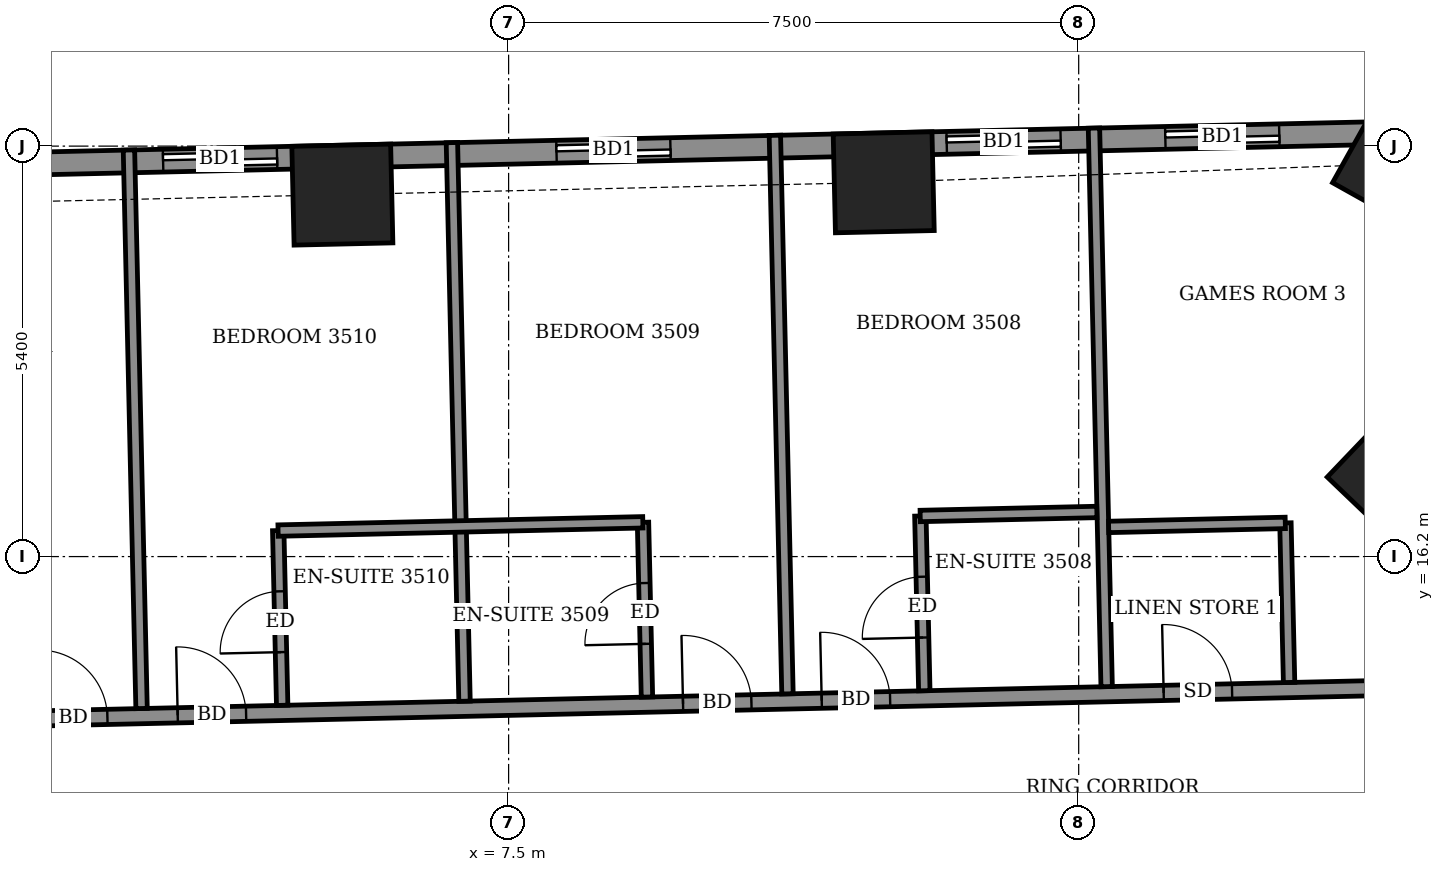
"""IFC4 building model, lengths in metres.
Left out: names, types, materials, properties, quantities, classifications, styles, units other than length and angle.
Written with IfcOpenShell. Run it as: python <this file> out.ifc"""

import sys

from ifc_helpers import new_model, si_unit, direction, frame, frame_2d, origin, origin_2d, place, context, subcontext, project, spatial, rectangle, extrude, element, fill, save


model = new_model("IFC4")
c1 = context("Model", 3, precision=1e-05, world=origin(), true_north=direction((0.0, 1.0)))
c2 = subcontext(c1, "Body", "Model", "MODEL_VIEW")
j1 = project(units=[si_unit("LENGTHUNIT", "METRE"), si_unit("PLANEANGLEUNIT", "RADIAN")], contexts=[c1])
p1 = place(None, origin())
s1 = spatial("IfcSite", under=j1, at=p1, CompositionType="ELEMENT")
p2 = place(p1, origin())
s2 = spatial("IfcBuilding", under=s1, at=p2, CompositionType="ELEMENT")
p3 = place(p2, frame((0.0, 0.0, 140.9)))
s3 = spatial("IfcBuildingStorey", under=s2, at=p3, CompositionType="ELEMENT", Elevation=140.9)
for number, where, z_axis, x_axis in (
    (1, (19.189, 17.267, -0.55), (0.0, 0.0, 1.0), (-0.723, 0.691, 0.0)),
    (2, (19.225, 21.369, -0.55), (0.0, 0.0, 1.0), (-0.873, 0.488, 0.0)),
    (3, (12.435, 21.124, -0.55), (0.0, 0.0, 1.0), (-1.0, -0.023, 0.0)),
    (4, (5.313, 20.962, -0.55), (0.0, 0.0, 1.0), (-1.0, -0.023, 0.0)),
):
    element("IfcColumn", number, at=place(p3, frame(where, z_axis=z_axis, x_axis=x_axis)), inside=s3, PredefinedType="COLUMN", context=c2, shape_type="SweptSolid", body=[
        extrude(rectangle(XDim=1.3, YDim=1.3, at=origin_2d()), origin(), (0.0, 0.0, 1.0), 3.6),
    ])
p4 = place(p3, frame((19.396, 21.782, 0.0), z_axis=(0.0, 0.0, 1.0), x_axis=(-0.999742636707, -0.022686126826, 0.0)))
e5 = element("IfcWall", 5, at=p4, inside=s3, PredefinedType="SOLIDWALL", context=c2, shape_type="SweptSolid", body=[
    extrude(rectangle(XDim=42.444, YDim=0.3, at=frame_2d((21.222, 0.0))), origin(), (0.0, 0.0, 1.0), 3.05),
])
p5 = place(p4, frame((1.757, 0.0, 0.0)))
e6 = element("IfcOpeningElement", 6, at=p5, cuts=e5, PredefinedType="OPENING", context=c2, shape_type="SweptSolid", body=[
    extrude(rectangle(XDim=1.5, YDim=2.4, at=frame_2d((0.75, 1.2))), frame((0.0, 0.16, 0.0), z_axis=(0.0, -1.0, 0.0), x_axis=(1.0, 0.0, 0.0)), (0.0, 0.0, 1.0), 0.32),
])
p6 = place(p4, frame((4.634, 0.0, 0.0)))
e7 = element("IfcOpeningElement", 7, at=p6, cuts=e5, PredefinedType="OPENING", context=c2, shape_type="SweptSolid", body=[
    extrude(rectangle(XDim=1.5, YDim=2.4, at=frame_2d((0.75, 1.2))), frame((0.0, 0.16, 0.0), z_axis=(0.0, -1.0, 0.0), x_axis=(1.0, 0.0, 0.0)), (0.0, 0.0, 1.0), 0.32),
])
p7 = place(p4, frame((9.769, 0.0, 0.0)))
e8 = element("IfcOpeningElement", 8, at=p7, cuts=e5, PredefinedType="OPENING", context=c2, shape_type="SweptSolid", body=[
    extrude(rectangle(XDim=1.5, YDim=2.4, at=frame_2d((0.75, 1.2))), frame((0.0, 0.16, 0.0), z_axis=(0.0, -1.0, 0.0), x_axis=(1.0, 0.0, 0.0)), (0.0, 0.0, 1.0), 0.32),
])
p8 = place(p4, frame((14.946, 0.0, 0.0)))
e9 = element("IfcOpeningElement", 9, at=p8, cuts=e5, PredefinedType="OPENING", context=c2, shape_type="SweptSolid", body=[
    extrude(rectangle(XDim=1.5, YDim=2.4, at=frame_2d((0.75, 1.2))), frame((0.0, 0.16, 0.0), z_axis=(0.0, -1.0, 0.0), x_axis=(1.0, 0.0, 0.0)), (0.0, 0.0, 1.0), 0.32),
])
p9 = place(p4, frame((18.108, 0.0, 0.0)))
e10 = element("IfcOpeningElement", 10, at=p9, cuts=e5, PredefinedType="OPENING", context=c2, shape_type="SweptSolid", body=[
    extrude(rectangle(XDim=1.5, YDim=2.4, at=frame_2d((0.75, 1.2))), frame((0.0, 0.16, 0.0), z_axis=(0.0, -1.0, 0.0), x_axis=(1.0, 0.0, 0.0)), (0.0, 0.0, 1.0), 0.32),
])
p10 = place(p4, frame((22.733, 0.0, 0.0)))
e11 = element("IfcOpeningElement", 11, at=p10, cuts=e5, PredefinedType="OPENING", context=c2, shape_type="SweptSolid", body=[
    extrude(rectangle(XDim=1.5, YDim=2.4, at=frame_2d((0.75, 1.2))), frame((0.0, 0.16, 0.0), z_axis=(0.0, -1.0, 0.0), x_axis=(1.0, 0.0, 0.0)), (0.0, 0.0, 1.0), 0.32),
])
p11 = place(p4, frame((25.895, 0.0, 0.0)))
e12 = element("IfcOpeningElement", 12, at=p11, cuts=e5, PredefinedType="OPENING", context=c2, shape_type="SweptSolid", body=[
    extrude(rectangle(XDim=1.5, YDim=2.4, at=frame_2d((0.75, 1.2))), frame((0.0, 0.16, 0.0), z_axis=(0.0, -1.0, 0.0), x_axis=(1.0, 0.0, 0.0)), (0.0, 0.0, 1.0), 0.32),
])
p12 = place(p4, frame((30.944, 0.0, 0.0)))
e13 = element("IfcOpeningElement", 13, at=p12, cuts=e5, PredefinedType="OPENING", context=c2, shape_type="SweptSolid", body=[
    extrude(rectangle(XDim=1.5, YDim=2.4, at=frame_2d((0.75, 1.2))), frame((0.0, 0.16, 0.0), z_axis=(0.0, -1.0, 0.0), x_axis=(1.0, 0.0, 0.0)), (0.0, 0.0, 1.0), 0.32),
])
p13 = place(p4, frame((36.232, 0.0, 0.0)))
e14 = element("IfcOpeningElement", 14, at=p13, cuts=e5, PredefinedType="OPENING", context=c2, shape_type="SweptSolid", body=[
    extrude(rectangle(XDim=1.5, YDim=2.4, at=frame_2d((0.75, 1.2))), frame((0.0, 0.16, 0.0), z_axis=(0.0, -1.0, 0.0), x_axis=(1.0, 0.0, 0.0)), (0.0, 0.0, 1.0), 0.32),
])
p14 = place(p4, frame((38.612, 0.0, 0.9)))
e15 = element("IfcOpeningElement", 15, at=p14, cuts=e5, PredefinedType="OPENING", context=c2, shape_type="SweptSolid", body=[
    extrude(rectangle(XDim=2.4, YDim=1.5, at=frame_2d((1.2, 0.75))), frame((0.0, 0.16, 0.0), z_axis=(0.0, -1.0, 0.0), x_axis=(1.0, 0.0, 0.0)), (0.0, 0.0, 1.0), 0.32),
])
p15 = place(p3, frame((16.679, 12.918, 0.0), z_axis=(0.0, 0.0, 1.0), x_axis=(0.999739057042, 0.022843332181, 0.0)))
e16 = element("IfcWall", 16, at=p15, inside=s3, PredefinedType="PARTITIONING", context=c2, shape_type="SweptSolid", body=[
    extrude(rectangle(XDim=5.867, YDim=0.2, at=frame_2d((2.934, 0.0))), origin(), (0.0, 0.0, 1.0), 3.05),
])
p16 = place(p15, frame((3.134, 0.0, 0.0)))
e17 = element("IfcOpeningElement", 17, at=p16, cuts=e16, PredefinedType="OPENING", context=c2, shape_type="SweptSolid", body=[
    extrude(rectangle(XDim=1.0, YDim=2.1, at=frame_2d((0.5, 1.05))), frame((0.0, 0.11, 0.0), z_axis=(0.0, -1.0, 0.0), x_axis=(1.0, 0.0, 0.0)), (0.0, 0.0, 1.0), 0.22),
])
p17 = place(p3, frame((-26.421, 13.441, 0.0), z_axis=(0.0, 0.0, 1.0), x_axis=(0.999742754064, 0.022680954485, 0.0)))
e18 = element("IfcWall", 18, at=p17, inside=s3, PredefinedType="PARTITIONING", context=c2, shape_type="SweptSolid", body=[
    extrude(rectangle(XDim=48.945, YDim=0.2, at=frame_2d((24.472, 0.0))), origin(), (0.0, 0.0, 1.0), 3.05),
])
p18 = place(p17, frame((46.772, 0.0, 0.0)))
e19 = element("IfcOpeningElement", 19, at=p18, cuts=e18, PredefinedType="OPENING", context=c2, shape_type="SweptSolid", body=[
    extrude(rectangle(XDim=1.0, YDim=2.1, at=frame_2d((0.5, 1.05))), frame((0.0, 0.11, 0.0), z_axis=(0.0, -1.0, 0.0), x_axis=(1.0, 0.0, 0.0)), (0.0, 0.0, 1.0), 0.22),
])
p19 = place(p17, frame((42.55, 0.0, 0.0)))
e20 = element("IfcOpeningElement", 20, at=p19, cuts=e18, PredefinedType="OPENING", context=c2, shape_type="SweptSolid", body=[
    extrude(rectangle(XDim=0.9, YDim=2.1, at=frame_2d((0.45, 1.05))), frame((0.0, 0.11, 0.0), z_axis=(0.0, -1.0, 0.0), x_axis=(1.0, 0.0, 0.0)), (0.0, 0.0, 1.0), 0.22),
])
p20 = place(p17, frame((38.05, 0.0, 0.0)))
e21 = element("IfcOpeningElement", 21, at=p20, cuts=e18, PredefinedType="OPENING", context=c2, shape_type="SweptSolid", body=[
    extrude(rectangle(XDim=0.9, YDim=2.1, at=frame_2d((0.45, 1.05))), frame((0.0, 0.11, 0.0), z_axis=(0.0, -1.0, 0.0), x_axis=(1.0, 0.0, 0.0)), (0.0, 0.0, 1.0), 0.22),
])
p21 = place(p17, frame((36.225, 0.0, 0.0)))
e22 = element("IfcOpeningElement", 22, at=p21, cuts=e18, PredefinedType="OPENING", context=c2, shape_type="SweptSolid", body=[
    extrude(rectangle(XDim=0.9, YDim=2.1, at=frame_2d((0.45, 1.05))), frame((0.0, 0.11, 0.0), z_axis=(0.0, -1.0, 0.0), x_axis=(1.0, 0.0, 0.0)), (0.0, 0.0, 1.0), 0.22),
])
p22 = place(p17, frame((29.575, 0.0, 0.0)))
e23 = element("IfcOpeningElement", 23, at=p22, cuts=e18, PredefinedType="OPENING", context=c2, shape_type="SweptSolid", body=[
    extrude(rectangle(XDim=0.9, YDim=2.1, at=frame_2d((0.45, 1.05))), frame((0.0, 0.11, 0.0), z_axis=(0.0, -1.0, 0.0), x_axis=(1.0, 0.0, 0.0)), (0.0, 0.0, 1.0), 0.22),
])
p23 = place(p17, frame((27.75, 0.0, 0.0)))
e24 = element("IfcOpeningElement", 24, at=p23, cuts=e18, PredefinedType="OPENING", context=c2, shape_type="SweptSolid", body=[
    extrude(rectangle(XDim=0.9, YDim=2.1, at=frame_2d((0.45, 1.05))), frame((0.0, 0.11, 0.0), z_axis=(0.0, -1.0, 0.0), x_axis=(1.0, 0.0, 0.0)), (0.0, 0.0, 1.0), 0.22),
])
p24 = place(p17, frame((21.125, 0.0, 0.0)))
e25 = element("IfcOpeningElement", 25, at=p24, cuts=e18, PredefinedType="OPENING", context=c2, shape_type="SweptSolid", body=[
    extrude(rectangle(XDim=0.9, YDim=2.1, at=frame_2d((0.45, 1.05))), frame((0.0, 0.11, 0.0), z_axis=(0.0, -1.0, 0.0), x_axis=(1.0, 0.0, 0.0)), (0.0, 0.0, 1.0), 0.22),
])
p25 = place(p17, frame((19.275, 0.0, 0.0)))
e26 = element("IfcOpeningElement", 26, at=p25, cuts=e18, PredefinedType="OPENING", context=c2, shape_type="SweptSolid", body=[
    extrude(rectangle(XDim=0.9, YDim=2.1, at=frame_2d((0.45, 1.05))), frame((0.0, 0.11, 0.0), z_axis=(0.0, -1.0, 0.0), x_axis=(1.0, 0.0, 0.0)), (0.0, 0.0, 1.0), 0.22),
])
p26 = place(p17, frame((12.65, 0.0, 0.0)))
e27 = element("IfcOpeningElement", 27, at=p26, cuts=e18, PredefinedType="OPENING", context=c2, shape_type="SweptSolid", body=[
    extrude(rectangle(XDim=0.9, YDim=2.1, at=frame_2d((0.45, 1.05))), frame((0.0, 0.11, 0.0), z_axis=(0.0, -1.0, 0.0), x_axis=(1.0, 0.0, 0.0)), (0.0, 0.0, 1.0), 0.22),
])
p27 = place(p17, frame((10.8, 0.0, 0.0)))
e28 = element("IfcOpeningElement", 28, at=p27, cuts=e18, PredefinedType="OPENING", context=c2, shape_type="SweptSolid", body=[
    extrude(rectangle(XDim=0.9, YDim=2.1, at=frame_2d((0.45, 1.05))), frame((0.0, 0.11, 0.0), z_axis=(0.0, -1.0, 0.0), x_axis=(1.0, 0.0, 0.0)), (0.0, 0.0, 1.0), 0.22),
])
p28 = place(p17, frame((1.55, 0.0, 0.0)))
e29 = element("IfcOpeningElement", 29, at=p28, cuts=e18, PredefinedType="OPENING", context=c2, shape_type="SweptSolid", body=[
    extrude(rectangle(XDim=1.0, YDim=2.1, at=frame_2d((0.5, 1.05))), frame((0.0, 0.11, 0.0), z_axis=(0.0, -1.0, 0.0), x_axis=(1.0, 0.0, 0.0)), (0.0, 0.0, 1.0), 0.22),
])
p29 = place(p17, frame((6.25, 0.0, 0.0)))
e30 = element("IfcOpeningElement", 30, at=p29, cuts=e18, PredefinedType="OPENING", context=c2, shape_type="SweptSolid", body=[
    extrude(rectangle(XDim=0.9, YDim=2.1, at=frame_2d((0.45, 1.05))), frame((0.0, 0.11, 0.0), z_axis=(0.0, -1.0, 0.0), x_axis=(1.0, 0.0, 0.0)), (0.0, 0.0, 1.0), 0.22),
])
p30 = place(p3, frame((2.671, 14.201, 0.0), z_axis=(0.0, 0.0, 1.0), x_axis=(-0.022587099398, 0.999744878927, 0.0)))
e31 = element("IfcWall", 31, at=p30, inside=s3, PredefinedType="PARTITIONING", context=c2, shape_type="SweptSolid", body=[
    extrude(rectangle(XDim=7.35, YDim=0.15, at=frame_2d((3.675, 0.0))), origin(), (0.0, 0.0, 1.0), 2.55),
])
p31 = place(p3, frame((4.521, 14.243, 0.0), z_axis=(0.0, 0.0, 1.0), x_axis=(-0.022612884682, 0.999744296031, 0.0)))
e32 = element("IfcWall", 32, at=p31, inside=s3, PredefinedType="PARTITIONING", context=c2, shape_type="SweptSolid", body=[
    extrude(rectangle(XDim=2.3, YDim=0.15, at=frame_2d((1.15, 0.0))), origin(), (0.0, 0.0, 1.0), 3.05),
])
p32 = place(p31, frame((0.7, 0.0, 0.0)))
e33 = element("IfcOpeningElement", 33, at=p32, cuts=e32, PredefinedType="OPENING", context=c2, shape_type="SweptSolid", body=[
    extrude(rectangle(XDim=0.8, YDim=2.1, at=frame_2d((0.4, 1.05))), frame((0.0, 0.085, 0.0), z_axis=(0.0, -1.0, 0.0), x_axis=(1.0, 0.0, 0.0)), (0.0, 0.0, 1.0), 0.17),
])
p33 = place(p3, frame((6.92, 14.297, 0.0), z_axis=(0.0, 0.0, 1.0), x_axis=(-0.022584849415, 0.999744929758, 0.0)))
e34 = element("IfcWall", 34, at=p33, inside=s3, PredefinedType="PARTITIONING", context=c2, shape_type="SweptSolid", body=[
    extrude(rectangle(XDim=7.351, YDim=0.15, at=frame_2d((3.675, 0.0))), origin(), (0.0, 0.0, 1.0), 2.55),
])
p34 = place(p3, frame((9.32, 14.352, 0.0), z_axis=(0.0, 0.0, 1.0), x_axis=(-0.022615284993, 0.999744241736, 0.0)))
e35 = element("IfcWall", 35, at=p34, inside=s3, PredefinedType="PARTITIONING", context=c2, shape_type="SweptSolid", body=[
    extrude(rectangle(XDim=2.299, YDim=0.15, at=frame_2d((1.15, 0.0))), origin(), (0.0, 0.0, 1.0), 3.05),
])
p35 = place(p34, frame((0.7, 0.0, 0.0)))
e36 = element("IfcOpeningElement", 36, at=p35, cuts=e35, PredefinedType="OPENING", context=c2, shape_type="SweptSolid", body=[
    extrude(rectangle(XDim=0.8, YDim=2.1, at=frame_2d((0.4, 1.05))), frame((0.0, 0.085, 0.0), z_axis=(0.0, -1.0, 0.0), x_axis=(1.0, 0.0, 0.0)), (0.0, 0.0, 1.0), 0.17),
])
p36 = place(p3, frame((11.169, 14.394, 0.0), z_axis=(0.0, 0.0, 1.0), x_axis=(-0.022587849492, 0.99974486198, 0.0)))
e37 = element("IfcWall", 37, at=p36, inside=s3, PredefinedType="PARTITIONING", context=c2, shape_type="SweptSolid", body=[
    extrude(rectangle(XDim=7.35, YDim=0.15, at=frame_2d((3.675, 0.0))), origin(), (0.0, 0.0, 1.0), 2.55),
])
p37 = place(p3, frame((12.969, 14.435, 0.0), z_axis=(0.0, 0.0, 1.0), x_axis=(-0.022615284993, 0.999744241736, 0.0)))
e38 = element("IfcWall", 38, at=p37, inside=s3, PredefinedType="PARTITIONING", context=c2, shape_type="SweptSolid", body=[
    extrude(rectangle(XDim=2.299, YDim=0.15, at=frame_2d((1.15, 0.0))), origin(), (0.0, 0.0, 1.0), 3.05),
])
p38 = place(p37, frame((0.7, 0.0, 0.0)))
e39 = element("IfcOpeningElement", 39, at=p38, cuts=e38, PredefinedType="OPENING", context=c2, shape_type="SweptSolid", body=[
    extrude(rectangle(XDim=0.8, YDim=2.1, at=frame_2d((0.4, 1.05))), frame((0.0, 0.085, 0.0), z_axis=(0.0, -1.0, 0.0), x_axis=(1.0, 0.0, 0.0)), (0.0, 0.0, 1.0), 0.17),
])
p39 = place(p3, frame((15.368, 14.489, 0.0), z_axis=(0.0, 0.0, 1.0), x_axis=(-0.022720650804, 0.999741852694, 0.0)))
e40 = element("IfcWall", 40, at=p39, inside=s3, PredefinedType="PARTITIONING", context=c2, shape_type="SweptSolid", body=[
    extrude(rectangle(XDim=7.35, YDim=0.15, at=frame_2d((3.675, 0.0))), origin(), (0.0, 0.0, 1.0), 2.55),
])
p40 = place(p3, frame((17.768, 14.544, 0.0), z_axis=(0.0, 0.0, 1.0), x_axis=(-0.022906293375, 0.999737616439, 0.0)))
e41 = element("IfcWall", 41, at=p40, inside=s3, PredefinedType="PARTITIONING", context=c2, shape_type="SweptSolid", body=[
    extrude(rectangle(XDim=2.1, YDim=0.15, at=frame_2d((1.05, 0.0))), origin(), (0.0, 0.0, 1.0), 3.05),
])
p41 = place(p3, frame((15.394, 16.59, 0.0), z_axis=(0.0, 0.0, 1.0), x_axis=(0.999740260747, 0.02279059109, 0.0)))
e42 = element("IfcWall", 42, at=p41, inside=s3, PredefinedType="PARTITIONING", context=c2, shape_type="SweptSolid", body=[
    extrude(rectangle(XDim=2.324, YDim=0.15, at=frame_2d((1.162, 0.0))), origin(), (0.0, 0.0, 1.0), 3.05),
])
p42 = place(p3, frame((4.467, 16.542, 0.0), z_axis=(0.0, 0.0, 1.0), x_axis=(0.999742701292, 0.022683280499, 0.0)))
e43 = element("IfcWall", 43, at=p42, inside=s3, PredefinedType="PARTITIONING", context=c2, shape_type="SweptSolid", body=[
    extrude(rectangle(XDim=4.8, YDim=0.15, at=frame_2d((2.4, 0.0))), origin(), (0.0, 0.0, 1.0), 3.05),
])
p43 = place(p3, frame((12.915, 16.734, 0.0), z_axis=(0.0, 0.0, 1.0), x_axis=(0.999737862264, 0.022895561926, 0.0)))
e44 = element("IfcWall", 44, at=p43, inside=s3, PredefinedType="PARTITIONING", context=c2, shape_type="SweptSolid", body=[
    extrude(rectangle(XDim=2.324, YDim=0.15, at=frame_2d((1.162, 0.0))), origin(), (0.0, 0.0, 1.0), 3.05),
])
p44 = place(p5, origin())
e45 = element("IfcDoor", 45, at=p44, inside=s3, OperationType="SLIDING_TO_LEFT", PredefinedType="DOOR", context=c2, shape_type="SweptSolid", body=[
    extrude(rectangle(XDim=1.5, YDim=2.4, at=frame_2d((0.75, 1.2))), frame((0.0, 0.025, 0.0), z_axis=(0.0, -1.0, 0.0), x_axis=(1.0, 0.0, 0.0)), (0.0, 0.0, 1.0), 0.05),
])
fill(e6, e45)
p45 = place(p6, origin())
e46 = element("IfcDoor", 46, at=p45, inside=s3, OperationType="SLIDING_TO_LEFT", PredefinedType="DOOR", context=c2, shape_type="SweptSolid", body=[
    extrude(rectangle(XDim=1.5, YDim=2.4, at=frame_2d((0.75, 1.2))), frame((0.0, 0.025, 0.0), z_axis=(0.0, -1.0, 0.0), x_axis=(1.0, 0.0, 0.0)), (0.0, 0.0, 1.0), 0.05),
])
fill(e7, e46)
p46 = place(p7, origin())
e47 = element("IfcDoor", 47, at=p46, inside=s3, OperationType="SLIDING_TO_LEFT", PredefinedType="DOOR", context=c2, shape_type="SweptSolid", body=[
    extrude(rectangle(XDim=1.5, YDim=2.4, at=frame_2d((0.75, 1.2))), frame((0.0, 0.025, 0.0), z_axis=(0.0, -1.0, 0.0), x_axis=(1.0, 0.0, 0.0)), (0.0, 0.0, 1.0), 0.05),
])
fill(e8, e47)
p47 = place(p8, origin())
e48 = element("IfcDoor", 48, at=p47, inside=s3, OperationType="SLIDING_TO_LEFT", PredefinedType="DOOR", context=c2, shape_type="SweptSolid", body=[
    extrude(rectangle(XDim=1.5, YDim=2.4, at=frame_2d((0.75, 1.2))), frame((0.0, 0.025, 0.0), z_axis=(0.0, -1.0, 0.0), x_axis=(1.0, 0.0, 0.0)), (0.0, 0.0, 1.0), 0.05),
])
fill(e9, e48)
p48 = place(p19, origin())
e49 = element("IfcDoor", 49, at=p48, inside=s3, OperationType="SINGLE_SWING_LEFT", PredefinedType="DOOR", context=c2, shape_type="SweptSolid", body=[
    extrude(rectangle(XDim=0.9, YDim=2.1, at=frame_2d((0.45, 1.05))), frame((0.0, 0.025, 0.0), z_axis=(0.0, -1.0, 0.0), x_axis=(1.0, 0.0, 0.0)), (0.0, 0.0, 1.0), 0.05),
])
fill(e20, e49)
p49 = place(p20, origin())
e50 = element("IfcDoor", 50, at=p49, inside=s3, OperationType="SINGLE_SWING_RIGHT", PredefinedType="DOOR", context=c2, shape_type="SweptSolid", body=[
    extrude(rectangle(XDim=0.9, YDim=2.1, at=frame_2d((0.45, 1.05))), frame((0.0, 0.025, 0.0), z_axis=(0.0, -1.0, 0.0), x_axis=(1.0, 0.0, 0.0)), (0.0, 0.0, 1.0), 0.05),
])
fill(e21, e50)
p50 = place(p38, origin())
e51 = element("IfcDoor", 51, at=p50, inside=s3, OperationType="SINGLE_SWING_RIGHT", PredefinedType="DOOR", context=c2, shape_type="SweptSolid", body=[
    extrude(rectangle(XDim=0.8, YDim=2.1, at=frame_2d((0.4, 1.05))), frame((0.0, 0.025, 0.0), z_axis=(0.0, -1.0, 0.0), x_axis=(1.0, 0.0, 0.0)), (0.0, 0.0, 1.0), 0.05),
])
fill(e39, e51)
p51 = place(p21, origin())
e52 = element("IfcDoor", 52, at=p51, inside=s3, OperationType="SINGLE_SWING_LEFT", PredefinedType="DOOR", context=c2, shape_type="SweptSolid", body=[
    extrude(rectangle(XDim=0.9, YDim=2.1, at=frame_2d((0.45, 1.05))), frame((0.0, 0.025, 0.0), z_axis=(0.0, -1.0, 0.0), x_axis=(1.0, 0.0, 0.0)), (0.0, 0.0, 1.0), 0.05),
])
fill(e22, e52)
p52 = place(p35, origin())
e53 = element("IfcDoor", 53, at=p52, inside=s3, OperationType="SINGLE_SWING_LEFT", PredefinedType="DOOR", context=c2, shape_type="SweptSolid", body=[
    extrude(rectangle(XDim=0.8, YDim=2.1, at=frame_2d((0.4, 1.05))), frame((0.0, 0.025, 0.0), z_axis=(0.0, -1.0, 0.0), x_axis=(1.0, 0.0, 0.0)), (0.0, 0.0, 1.0), 0.05),
])
fill(e36, e53)
p53 = place(p22, origin())
e54 = element("IfcDoor", 54, at=p53, inside=s3, OperationType="SINGLE_SWING_RIGHT", PredefinedType="DOOR", context=c2, shape_type="SweptSolid", body=[
    extrude(rectangle(XDim=0.9, YDim=2.1, at=frame_2d((0.45, 1.05))), frame((0.0, 0.025, 0.0), z_axis=(0.0, -1.0, 0.0), x_axis=(1.0, 0.0, 0.0)), (0.0, 0.0, 1.0), 0.05),
])
fill(e23, e54)
p54 = place(p32, origin())
e55 = element("IfcDoor", 55, at=p54, inside=s3, OperationType="SINGLE_SWING_RIGHT", PredefinedType="DOOR", context=c2, shape_type="SweptSolid", body=[
    extrude(rectangle(XDim=0.8, YDim=2.1, at=frame_2d((0.4, 1.05))), frame((0.0, 0.025, 0.0), z_axis=(0.0, -1.0, 0.0), x_axis=(1.0, 0.0, 0.0)), (0.0, 0.0, 1.0), 0.05),
])
fill(e33, e55)
p55 = place(p23, origin())
e56 = element("IfcDoor", 56, at=p55, inside=s3, OperationType="SINGLE_SWING_LEFT", PredefinedType="DOOR", context=c2, shape_type="SweptSolid", body=[
    extrude(rectangle(XDim=0.9, YDim=2.1, at=frame_2d((0.45, 1.05))), frame((0.0, 0.025, 0.0), z_axis=(0.0, -1.0, 0.0), x_axis=(1.0, 0.0, 0.0)), (0.0, 0.0, 1.0), 0.05),
])
fill(e24, e56)
save(model, sys.argv[1])
